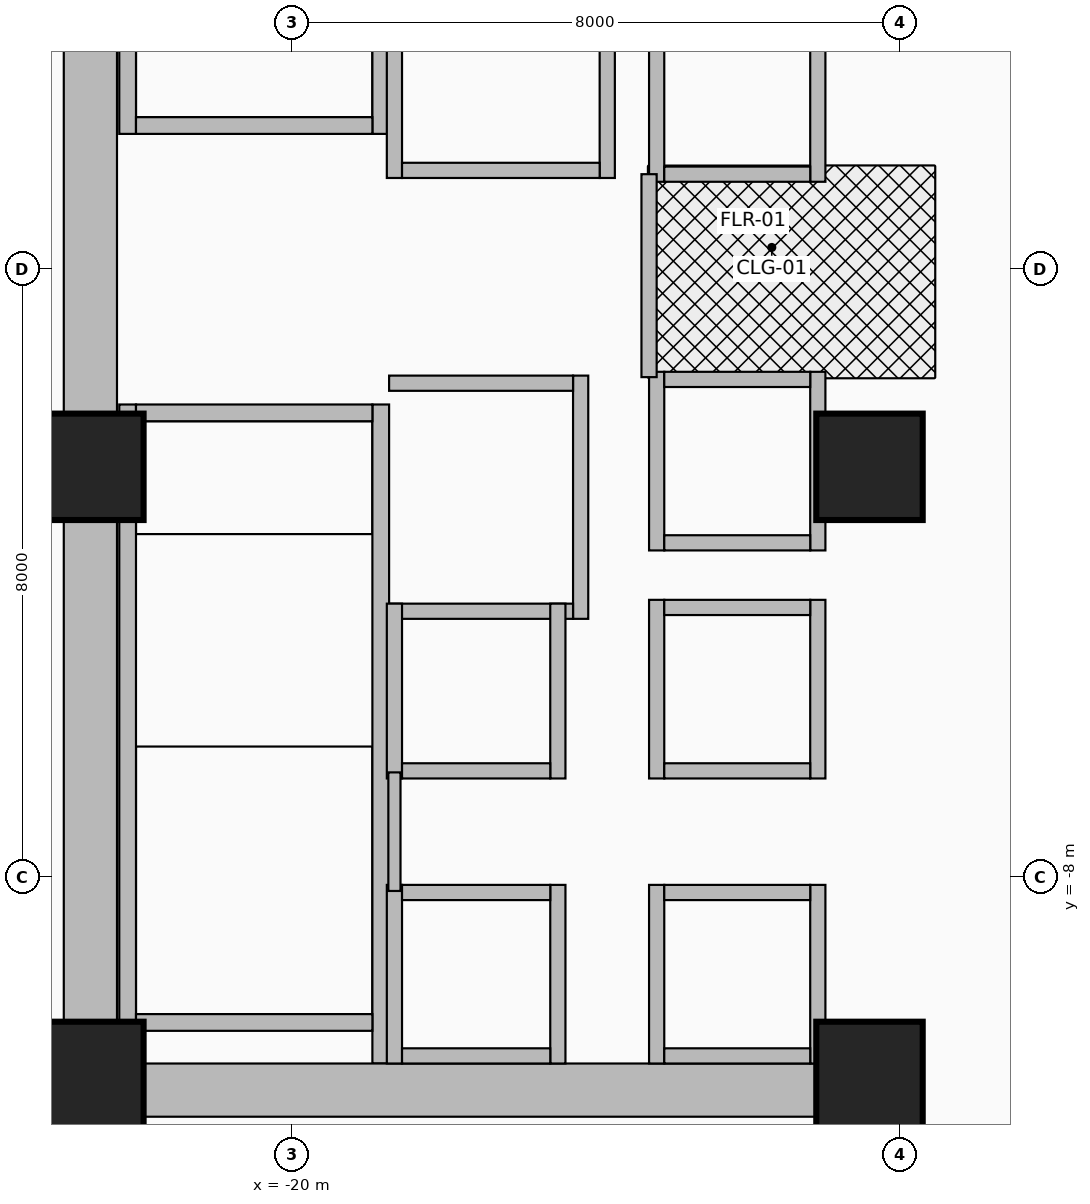
"""IFC4 building model, lengths in metres.
Left out: names, types, materials, properties, quantities, classifications, styles, units other than length and angle.
Written with IfcOpenShell. Run it as: python <this file> out.ifc"""

import sys

from ifc_helpers import new_model, si_unit, direction, frame, frame_2d, origin, origin_2d, place, context, subcontext, project, spatial, rectangle, extrude, source, transform, mapped, element, fill, save


model = new_model("IFC4")
c1 = context("Model", 3, precision=1e-05, world=origin(), true_north=direction((0.0, 1.0)))
c2 = subcontext(c1, "Body", "Model", "MODEL_VIEW")
j1 = project(units=[si_unit("LENGTHUNIT", "METRE"), si_unit("PLANEANGLEUNIT", "RADIAN")], contexts=[c1])
p1 = place(None, origin())
s1 = spatial("IfcSite", under=j1, at=p1, CompositionType="ELEMENT")
p2 = place(p1, origin())
s2 = spatial("IfcBuilding", under=s1, at=p2, CompositionType="ELEMENT")
p3 = place(p2, frame((0.0, 0.0, 70.4)))
s3 = spatial("IfcBuildingStorey", under=s2, at=p3, CompositionType="ELEMENT", Elevation=70.4)
for number, where, z_axis, x_axis in (
    (1, (-22.16, 1.78, 0.0), (0.0, 0.0, 1.0), (0.0, 1.0, 0.0)),
    (2, (-18.83, 1.78, 0.0), (0.0, 0.0, 1.0), (0.0, 1.0, 0.0)),
):
    element("IfcWall", number, at=place(p3, frame(where, z_axis=z_axis, x_axis=x_axis)), inside=s3, PredefinedType="SHEAR", context=c2, shape_type="SweptSolid", body=[
        extrude(rectangle(XDim=8.67, YDim=0.22, at=frame_2d((4.335, 0.0))), origin(), (0.0, 0.0, 1.0), 3.46),
    ])
p4 = place(p3, frame((-22.05, 1.89, 0.0), z_axis=(0.0, 0.0, 1.0), x_axis=(1.0, 0.0, 0.0)))
e3 = element("IfcWall", 3, at=p4, inside=s3, PredefinedType="SHEAR", context=c2, shape_type="SweptSolid", body=[
    extrude(rectangle(XDim=3.11, YDim=0.22, at=frame_2d((1.555, 0.0))), origin(), (0.0, 0.0, 1.0), 3.46),
])
p5 = place(p4, frame((1.0, 0.0, 0.0)))
e4 = element("IfcOpeningElement", 4, at=p5, cuts=e3, PredefinedType="OPENING", context=c2, shape_type="SweptSolid", body=[
    extrude(rectangle(XDim=1.1, YDim=2.15, at=frame_2d((0.55, 1.075))), frame((0.0, 0.125, 0.0), z_axis=(0.0, -1.0, 0.0), x_axis=(1.0, 0.0, 0.0)), (0.0, 0.0, 1.0), 0.25),
])
for number, where, z_axis, x_axis in (
    (5, (-22.16, -10.45, 0.0), (0.0, 0.0, 1.0), (0.0, 1.0, 0.0)),
    (6, (-18.83, -10.45, 0.0), (0.0, 0.0, 1.0), (0.0, 1.0, 0.0)),
):
    element("IfcWall", number, at=place(p3, frame(where, z_axis=z_axis, x_axis=x_axis)), inside=s3, PredefinedType="SHEAR", context=c2, shape_type="SweptSolid", body=[
        extrude(rectangle(XDim=8.67, YDim=0.22, at=frame_2d((4.335, 0.0))), origin(), (0.0, 0.0, 1.0), 3.46),
    ])
p6 = place(p3, frame((-22.05, -9.91, 0.0), z_axis=(0.0, 0.0, 1.0), x_axis=(1.0, 0.0, 0.0)))
e7 = element("IfcWall", 7, at=p6, inside=s3, PredefinedType="SHEAR", context=c2, shape_type="SweptSolid", body=[
    extrude(rectangle(XDim=3.11, YDim=0.22, at=frame_2d((1.555, 0.0))), origin(), (0.0, 0.0, 1.0), 3.46),
])
p7 = place(p3, frame((-22.05, -1.89, 0.0), z_axis=(0.0, 0.0, 1.0), x_axis=(1.0, 0.0, 0.0)))
e8 = element("IfcWall", 8, at=p7, inside=s3, PredefinedType="SHEAR", context=c2, shape_type="SweptSolid", body=[
    extrude(rectangle(XDim=3.11, YDim=0.22, at=frame_2d((1.555, 0.0))), origin(), (0.0, 0.0, 1.0), 3.46),
])
p8 = place(p7, frame((1.0, 0.0, 0.0)))
e9 = element("IfcOpeningElement", 9, at=p8, cuts=e8, PredefinedType="OPENING", context=c2, shape_type="SweptSolid", body=[
    extrude(rectangle(XDim=1.1, YDim=2.15, at=frame_2d((0.55, 1.075))), frame((0.0, 0.125, 0.0), z_axis=(0.0, -1.0, 0.0), x_axis=(1.0, 0.0, 0.0)), (0.0, 0.0, 1.0), 0.25),
])
p9 = place(p3, frame((-22.65, -11.15, 0.0), z_axis=(0.0, 0.0, 1.0), x_axis=(0.0, 1.0, 0.0)))
e10 = element("IfcWall", 10, at=p9, inside=s3, PredefinedType="SHEAR", context=c2, shape_type="SweptSolid", body=[
    extrude(rectangle(XDim=22.3, YDim=0.7, at=frame_2d((11.15, 0.0))), origin(), (0.0, 0.0, 1.0), 3.46),
])
p10 = place(p3, frame((-22.65, -10.8, 0.0), z_axis=(0.0, 0.0, 1.0), x_axis=(1.0, 0.0, 0.0)))
e11 = element("IfcWall", 11, at=p10, inside=s3, PredefinedType="SHEAR", context=c2, shape_type="SweptSolid", body=[
    extrude(rectangle(XDim=10.25, YDim=0.7, at=frame_2d((5.125, 0.0))), origin(), (0.0, 0.0, 1.0), 3.46),
])
m1 = source(origin(), c2, "Body", "SweptSolid", [
    extrude(rectangle(XDim=1.4, YDim=1.4, at=origin_2d()), origin(), (0.0, 0.0, 1.0), 3.7),
])
for number, where, z_axis, x_axis in (
    (12, (-22.65, -10.6, 0.0), (0.0, 0.0, 1.0), (1.0, 0.0, 0.0)),
    (13, (-12.4, -10.6, 0.0), (0.0, 0.0, 1.0), (1.0, 0.0, 0.0)),
    (14, (-22.65, -2.6, 0.0), (0.0, 0.0, 1.0), (1.0, 0.0, 0.0)),
    (15, (-12.4, -2.6, 0.0), (0.0, 0.0, 1.0), (1.0, 0.0, 0.0)),
):
    element("IfcColumn", number, at=place(p3, frame(where, z_axis=z_axis, x_axis=x_axis)), inside=s3, PredefinedType="COLUMN", context=c2, shape_type="MappedRepresentation", body=[
        mapped(m1, transform((0.0, 0.0, 0.0), x_axis=(1.0, 0.0, 0.0), y_axis=(0.0, 1.0, 0.0), z_axis=(0.0, 0.0, 1.0), scale=1.0)),
    ])
for number, where, z_axis, x_axis in (
    (16, (-18.65, 1.2, 0.0), (0.0, 0.0, 1.0), (0.0, 1.0, 0.0)),
    (17, (-15.85, 1.2, 0.0), (0.0, 0.0, 1.0), (0.0, 1.0, 0.0)),
):
    element("IfcWall", number, at=place(p3, frame(where, z_axis=z_axis, x_axis=x_axis)), inside=s3, PredefinedType="MOVABLE", context=c2, shape_type="SweptSolid", body=[
        extrude(rectangle(XDim=3.225, YDim=0.2, at=frame_2d((1.613, 0.0))), origin(), (0.0, 0.0, 1.0), 3.46),
    ])
p11 = place(p3, frame((-18.55, 1.3, 0.0), z_axis=(0.0, 0.0, 1.0), x_axis=(1.0, 0.0, 0.0)))
e18 = element("IfcWall", 18, at=p11, inside=s3, PredefinedType="MOVABLE", context=c2, shape_type="SweptSolid", body=[
    extrude(rectangle(XDim=2.6, YDim=0.2, at=frame_2d((1.3, 0.0))), origin(), (0.0, 0.0, 1.0), 3.46),
])
p12 = place(p11, frame((0.7, 0.0, 0.0)))
e19 = element("IfcOpeningElement", 19, at=p12, cuts=e18, PredefinedType="OPENING", context=c2, shape_type="SweptSolid", body=[
    extrude(rectangle(XDim=1.2, YDim=2.1, at=frame_2d((0.6, 1.05))), frame((0.0, 0.115, 0.0), z_axis=(0.0, -1.0, 0.0), x_axis=(1.0, 0.0, 0.0)), (0.0, 0.0, 1.0), 0.23),
])
p13 = place(p3, frame((-16.2, -4.6, 0.0), z_axis=(0.0, 0.0, 1.0), x_axis=(0.0, 1.0, 0.0)))
e20 = element("IfcWall", 20, at=p13, inside=s3, PredefinedType="MOVABLE", context=c2, shape_type="SweptSolid", body=[
    extrude(rectangle(XDim=3.2, YDim=0.2, at=frame_2d((1.6, 0.0))), origin(), (0.0, 0.0, 1.0), 3.46),
])
p14 = place(p3, frame((-18.72, -4.5, 0.0), z_axis=(0.0, 0.0, 1.0), x_axis=(1.0, 0.0, 0.0)))
e21 = element("IfcWall", 21, at=p14, inside=s3, PredefinedType="MOVABLE", context=c2, shape_type="SweptSolid", body=[
    extrude(rectangle(XDim=2.42, YDim=0.2, at=frame_2d((1.21, 0.0))), origin(), (0.0, 0.0, 1.0), 3.46),
])
p15 = place(p3, frame((-18.72, -1.5, 0.0), z_axis=(0.0, 0.0, 1.0), x_axis=(1.0, 0.0, 0.0)))
e22 = element("IfcWall", 22, at=p15, inside=s3, PredefinedType="MOVABLE", context=c2, shape_type="SweptSolid", body=[
    extrude(rectangle(XDim=2.42, YDim=0.2, at=frame_2d((1.21, 0.0))), origin(), (0.0, 0.0, 1.0), 3.46),
])
p16 = place(p15, frame((0.61, 0.0, 0.0)))
e23 = element("IfcOpeningElement", 23, at=p16, cuts=e22, PredefinedType="OPENING", context=c2, shape_type="SweptSolid", body=[
    extrude(rectangle(XDim=1.2, YDim=2.1, at=frame_2d((0.6, 1.05))), frame((0.0, 0.115, 0.0), z_axis=(0.0, -1.0, 0.0), x_axis=(1.0, 0.0, 0.0)), (0.0, 0.0, 1.0), 0.23),
])
for number, where, z_axis, x_axis in (
    (24, (-15.2, -10.45, 0.0), (0.0, 0.0, 1.0), (0.0, 1.0, 0.0)),
    (25, (-13.08, -10.45, 0.0), (0.0, 0.0, 1.0), (0.0, 1.0, 0.0)),
):
    element("IfcWall", number, at=place(p3, frame(where, z_axis=z_axis, x_axis=x_axis)), inside=s3, PredefinedType="MOVABLE", context=c2, shape_type="SweptSolid", body=[
        extrude(rectangle(XDim=2.35, YDim=0.2, at=frame_2d((1.175, 0.0))), origin(), (0.0, 0.0, 1.0), 2.583),
    ])
p17 = place(p3, frame((-15.1, -10.35, 0.0), z_axis=(0.0, 0.0, 1.0), x_axis=(1.0, 0.0, 0.0)))
e26 = element("IfcWall", 26, at=p17, inside=s3, PredefinedType="MOVABLE", context=c2, shape_type="SweptSolid", body=[
    extrude(rectangle(XDim=1.92, YDim=0.2, at=frame_2d((0.96, 0.0))), origin(), (0.0, 0.0, 1.0), 2.583),
])
p18 = place(p3, frame((-15.1, -8.2, 0.0), z_axis=(0.0, 0.0, 1.0), x_axis=(1.0, 0.0, 0.0)))
e27 = element("IfcWall", 27, at=p18, inside=s3, PredefinedType="MOVABLE", context=c2, shape_type="SweptSolid", body=[
    extrude(rectangle(XDim=1.92, YDim=0.2, at=frame_2d((0.96, 0.0))), origin(), (0.0, 0.0, 1.0), 3.46),
])
p19 = place(p18, frame((0.41, 0.0, 0.0)))
e28 = element("IfcOpeningElement", 28, at=p19, cuts=e27, PredefinedType="OPENING", context=c2, shape_type="SweptSolid", body=[
    extrude(rectangle(XDim=1.1, YDim=2.1, at=frame_2d((0.55, 1.05))), frame((0.0, 0.115, 0.0), z_axis=(0.0, -1.0, 0.0), x_axis=(1.0, 0.0, 0.0)), (0.0, 0.0, 1.0), 0.23),
])
for number, where, z_axis, x_axis in (
    (29, (-15.2, -6.7, 0.0), (0.0, 0.0, 1.0), (0.0, 1.0, 0.0)),
    (30, (-13.08, -6.7, 0.0), (0.0, 0.0, 1.0), (0.0, 1.0, 0.0)),
):
    element("IfcWall", number, at=place(p3, frame(where, z_axis=z_axis, x_axis=x_axis)), inside=s3, PredefinedType="MOVABLE", context=c2, shape_type="SweptSolid", body=[
        extrude(rectangle(XDim=2.35, YDim=0.2, at=frame_2d((1.175, 0.0))), origin(), (0.0, 0.0, 1.0), 3.46),
    ])
p20 = place(p3, frame((-15.1, -6.6, 0.0), z_axis=(0.0, 0.0, 1.0), x_axis=(1.0, 0.0, 0.0)))
e31 = element("IfcWall", 31, at=p20, inside=s3, PredefinedType="MOVABLE", context=c2, shape_type="SweptSolid", body=[
    extrude(rectangle(XDim=1.92, YDim=0.2, at=frame_2d((0.96, 0.0))), origin(), (0.0, 0.0, 1.0), 3.46),
])
p21 = place(p20, frame((0.41, 0.0, 0.0)))
e32 = element("IfcOpeningElement", 32, at=p21, cuts=e31, PredefinedType="OPENING", context=c2, shape_type="SweptSolid", body=[
    extrude(rectangle(XDim=1.1, YDim=2.1, at=frame_2d((0.55, 1.05))), frame((0.0, 0.115, 0.0), z_axis=(0.0, -1.0, 0.0), x_axis=(1.0, 0.0, 0.0)), (0.0, 0.0, 1.0), 0.23),
])
p22 = place(p3, frame((-15.1, -4.45, 0.0), z_axis=(0.0, 0.0, 1.0), x_axis=(1.0, 0.0, 0.0)))
e33 = element("IfcWall", 33, at=p22, inside=s3, PredefinedType="MOVABLE", context=c2, shape_type="SweptSolid", body=[
    extrude(rectangle(XDim=1.92, YDim=0.2, at=frame_2d((0.96, 0.0))), origin(), (0.0, 0.0, 1.0), 3.46),
])
for number, where, z_axis, x_axis in (
    (34, (-18.65, -10.45, 0.0), (0.0, 0.0, 1.0), (0.0, 1.0, 0.0)),
    (35, (-16.5, -10.45, 0.0), (0.0, 0.0, 1.0), (0.0, 1.0, 0.0)),
):
    element("IfcWall", number, at=place(p3, frame(where, z_axis=z_axis, x_axis=x_axis)), inside=s3, PredefinedType="MOVABLE", context=c2, shape_type="SweptSolid", body=[
        extrude(rectangle(XDim=2.35, YDim=0.2, at=frame_2d((1.175, 0.0))), origin(), (0.0, 0.0, 1.0), 2.583),
    ])
p23 = place(p3, frame((-18.55, -10.35, 0.0), z_axis=(0.0, 0.0, 1.0), x_axis=(1.0, 0.0, 0.0)))
e36 = element("IfcWall", 36, at=p23, inside=s3, PredefinedType="MOVABLE", context=c2, shape_type="SweptSolid", body=[
    extrude(rectangle(XDim=1.95, YDim=0.2, at=frame_2d((0.975, 0.0))), origin(), (0.0, 0.0, 1.0), 2.583),
])
p24 = place(p3, frame((-18.55, -8.2, 0.0), z_axis=(0.0, 0.0, 1.0), x_axis=(1.0, 0.0, 0.0)))
e37 = element("IfcWall", 37, at=p24, inside=s3, PredefinedType="MOVABLE", context=c2, shape_type="SweptSolid", body=[
    extrude(rectangle(XDim=1.95, YDim=0.2, at=frame_2d((0.975, 0.0))), origin(), (0.0, 0.0, 1.0), 3.46),
])
for number, where, z_axis, x_axis in (
    (38, (-15.2, 1.15, 0.0), (0.0, 0.0, 1.0), (0.0, 1.0, 0.0)),
    (39, (-13.08, 1.15, 0.0), (0.0, 0.0, 1.0), (0.0, 1.0, 0.0)),
):
    element("IfcWall", number, at=place(p3, frame(where, z_axis=z_axis, x_axis=x_axis)), inside=s3, PredefinedType="MOVABLE", context=c2, shape_type="SweptSolid", body=[
        extrude(rectangle(XDim=2.25, YDim=0.2, at=frame_2d((1.125, 0.0))), origin(), (0.0, 0.0, 1.0), 3.46),
    ])
p25 = place(p3, frame((-15.1, 1.25, 0.0), z_axis=(0.0, 0.0, 1.0), x_axis=(1.0, 0.0, 0.0)))
e40 = element("IfcWall", 40, at=p25, inside=s3, PredefinedType="MOVABLE", context=c2, shape_type="SweptSolid", body=[
    extrude(rectangle(XDim=1.92, YDim=0.2, at=frame_2d((0.96, 0.0))), origin(), (0.0, 0.0, 1.0), 3.46),
])
for number, where, z_axis, x_axis in (
    (41, (-18.65, -6.7, 0.0), (0.0, 0.0, 1.0), (0.0, 1.0, 0.0)),
    (42, (-16.5, -6.7, 0.0), (0.0, 0.0, 1.0), (0.0, 1.0, 0.0)),
):
    element("IfcWall", number, at=place(p3, frame(where, z_axis=z_axis, x_axis=x_axis)), inside=s3, PredefinedType="MOVABLE", context=c2, shape_type="SweptSolid", body=[
        extrude(rectangle(XDim=2.3, YDim=0.2, at=frame_2d((1.15, 0.0))), origin(), (0.0, 0.0, 1.0), 3.46),
    ])
p26 = place(p3, frame((-18.55, -6.6, 0.0), z_axis=(0.0, 0.0, 1.0), x_axis=(1.0, 0.0, 0.0)))
e43 = element("IfcWall", 43, at=p26, inside=s3, PredefinedType="MOVABLE", context=c2, shape_type="SweptSolid", body=[
    extrude(rectangle(XDim=1.95, YDim=0.2, at=frame_2d((0.975, 0.0))), origin(), (0.0, 0.0, 1.0), 3.46),
])
for number, where, z_axis, x_axis in (
    (44, (-15.2, -3.7, 0.0), (0.0, 0.0, 1.0), (0.0, 1.0, 0.0)),
    (45, (-13.08, -3.7, 0.0), (0.0, 0.0, 1.0), (0.0, 1.0, 0.0)),
):
    element("IfcWall", number, at=place(p3, frame(where, z_axis=z_axis, x_axis=x_axis)), inside=s3, PredefinedType="MOVABLE", context=c2, shape_type="SweptSolid", body=[
        extrude(rectangle(XDim=2.35, YDim=0.2, at=frame_2d((1.175, 0.0))), origin(), (0.0, 0.0, 1.0), 3.46),
    ])
for number, where, z_axis, x_axis in (
    (46, (-15.1, -3.6, 0.0), (0.0, 0.0, 1.0), (1.0, 0.0, 0.0)),
    (47, (-15.1, -1.45, 0.0), (0.0, 0.0, 1.0), (1.0, 0.0, 0.0)),
):
    element("IfcWall", number, at=place(p3, frame(where, z_axis=z_axis, x_axis=x_axis)), inside=s3, PredefinedType="MOVABLE", context=c2, shape_type="SweptSolid", body=[
        extrude(rectangle(XDim=1.92, YDim=0.2, at=frame_2d((0.96, 0.0))), origin(), (0.0, 0.0, 1.0), 3.46),
    ])
p27 = place(p3, frame((-15.3, -1.42, 0.0), z_axis=(0.0, 0.0, 1.0), x_axis=(0.0, 1.0, 0.0)))
e48 = element("IfcWall", 48, at=p27, inside=s3, PredefinedType="PARTITIONING", context=c2, shape_type="SweptSolid", body=[
    extrude(rectangle(XDim=2.67, YDim=0.2, at=frame_2d((1.335, 0.0))), origin(), (0.0, 0.0, 1.0), 3.46),
])
p28 = place(p27, frame((0.78, 0.0, 0.0)))
e49 = element("IfcOpeningElement", 49, at=p28, cuts=e48, PredefinedType="OPENING", context=c2, shape_type="SweptSolid", body=[
    extrude(rectangle(XDim=1.05, YDim=2.15, at=frame_2d((0.525, 1.075))), frame((0.0, 0.115, 0.0), z_axis=(0.0, -1.0, 0.0), x_axis=(1.0, 0.0, 0.0)), (0.0, 0.0, 1.0), 0.23),
])
p29 = place(p3, frame((-18.65, -8.18, 0.0), z_axis=(0.0, 0.0, 1.0), x_axis=(0.0, 1.0, 0.0)))
e50 = element("IfcWall", 50, at=p29, inside=s3, PredefinedType="PARTITIONING", context=c2, shape_type="SweptSolid", body=[
    extrude(rectangle(XDim=1.56, YDim=0.16, at=frame_2d((0.78, 0.0))), origin(), (0.0, 0.0, 1.0), 3.46),
])
p30 = place(p12, origin())
e51 = element("IfcDoor", 51, at=p30, inside=s3, OperationType="DOUBLE_DOOR_SLIDING", PredefinedType="DOOR", context=c2, shape_type="SweptSolid", body=[
    extrude(rectangle(XDim=1.2, YDim=2.1, at=frame_2d((0.6, 1.05))), frame((0.0, 0.025, 0.0), z_axis=(0.0, -1.0, 0.0), x_axis=(1.0, 0.0, 0.0)), (0.0, 0.0, 1.0), 0.05),
])
fill(e19, e51)
p31 = place(p16, origin())
e52 = element("IfcDoor", 52, at=p31, inside=s3, OperationType="DOUBLE_DOOR_SLIDING", PredefinedType="DOOR", context=c2, shape_type="SweptSolid", body=[
    extrude(rectangle(XDim=1.2, YDim=2.1, at=frame_2d((0.6, 1.05))), frame((0.0, 0.025, 0.0), z_axis=(0.0, -1.0, 0.0), x_axis=(1.0, 0.0, 0.0)), (0.0, 0.0, 1.0), 0.05),
])
fill(e23, e52)
p32 = place(p19, origin())
e53 = element("IfcDoor", 53, at=p32, inside=s3, OperationType="DOUBLE_DOOR_SLIDING", PredefinedType="DOOR", context=c2, shape_type="SweptSolid", body=[
    extrude(rectangle(XDim=1.1, YDim=2.1, at=frame_2d((0.55, 1.05))), frame((0.0, 0.025, 0.0), z_axis=(0.0, -1.0, 0.0), x_axis=(1.0, 0.0, 0.0)), (0.0, 0.0, 1.0), 0.05),
])
fill(e28, e53)
p33 = place(p21, origin())
e54 = element("IfcDoor", 54, at=p33, inside=s3, OperationType="DOUBLE_DOOR_SLIDING", PredefinedType="DOOR", context=c2, shape_type="SweptSolid", body=[
    extrude(rectangle(XDim=1.1, YDim=2.1, at=frame_2d((0.55, 1.05))), frame((0.0, 0.025, 0.0), z_axis=(0.0, -1.0, 0.0), x_axis=(1.0, 0.0, 0.0)), (0.0, 0.0, 1.0), 0.05),
])
fill(e32, e54)
p34 = place(p28, origin())
e55 = element("IfcDoor", 55, at=p34, inside=s3, OperationType="SINGLE_SWING_RIGHT", PredefinedType="DOOR", context=c2, shape_type="SweptSolid", body=[
    extrude(rectangle(XDim=1.05, YDim=2.15, at=frame_2d((0.525, 1.075))), frame((0.0, 0.025, 0.0), z_axis=(0.0, -1.0, 0.0), x_axis=(1.0, 0.0, 0.0)), (0.0, 0.0, 1.0), 0.05),
])
fill(e49, e55)
p35 = place(p5, frame((1.1, 0.0, 0.0), z_axis=(0.0, 0.0, 1.0), x_axis=(-1.0, 0.0, 0.0)))
e56 = element("IfcDoor", 56, at=p35, inside=s3, OperationType="SINGLE_SWING_LEFT", PredefinedType="DOOR", context=c2, shape_type="SweptSolid", body=[
    extrude(rectangle(XDim=1.1, YDim=2.15, at=frame_2d((0.55, 1.075))), frame((0.0, 0.025, 0.0), z_axis=(0.0, -1.0, 0.0), x_axis=(1.0, 0.0, 0.0)), (0.0, 0.0, 1.0), 0.05),
])
fill(e4, e56)
p36 = place(p8, origin())
e57 = element("IfcDoor", 57, at=p36, inside=s3, OperationType="SINGLE_SWING_RIGHT", PredefinedType="DOOR", context=c2, shape_type="SweptSolid", body=[
    extrude(rectangle(XDim=1.1, YDim=2.15, at=frame_2d((0.55, 1.075))), frame((0.0, 0.025, 0.0), z_axis=(0.0, -1.0, 0.0), x_axis=(1.0, 0.0, 0.0)), (0.0, 0.0, 1.0), 0.05),
])
fill(e9, e57)
save(model, sys.argv[1])
